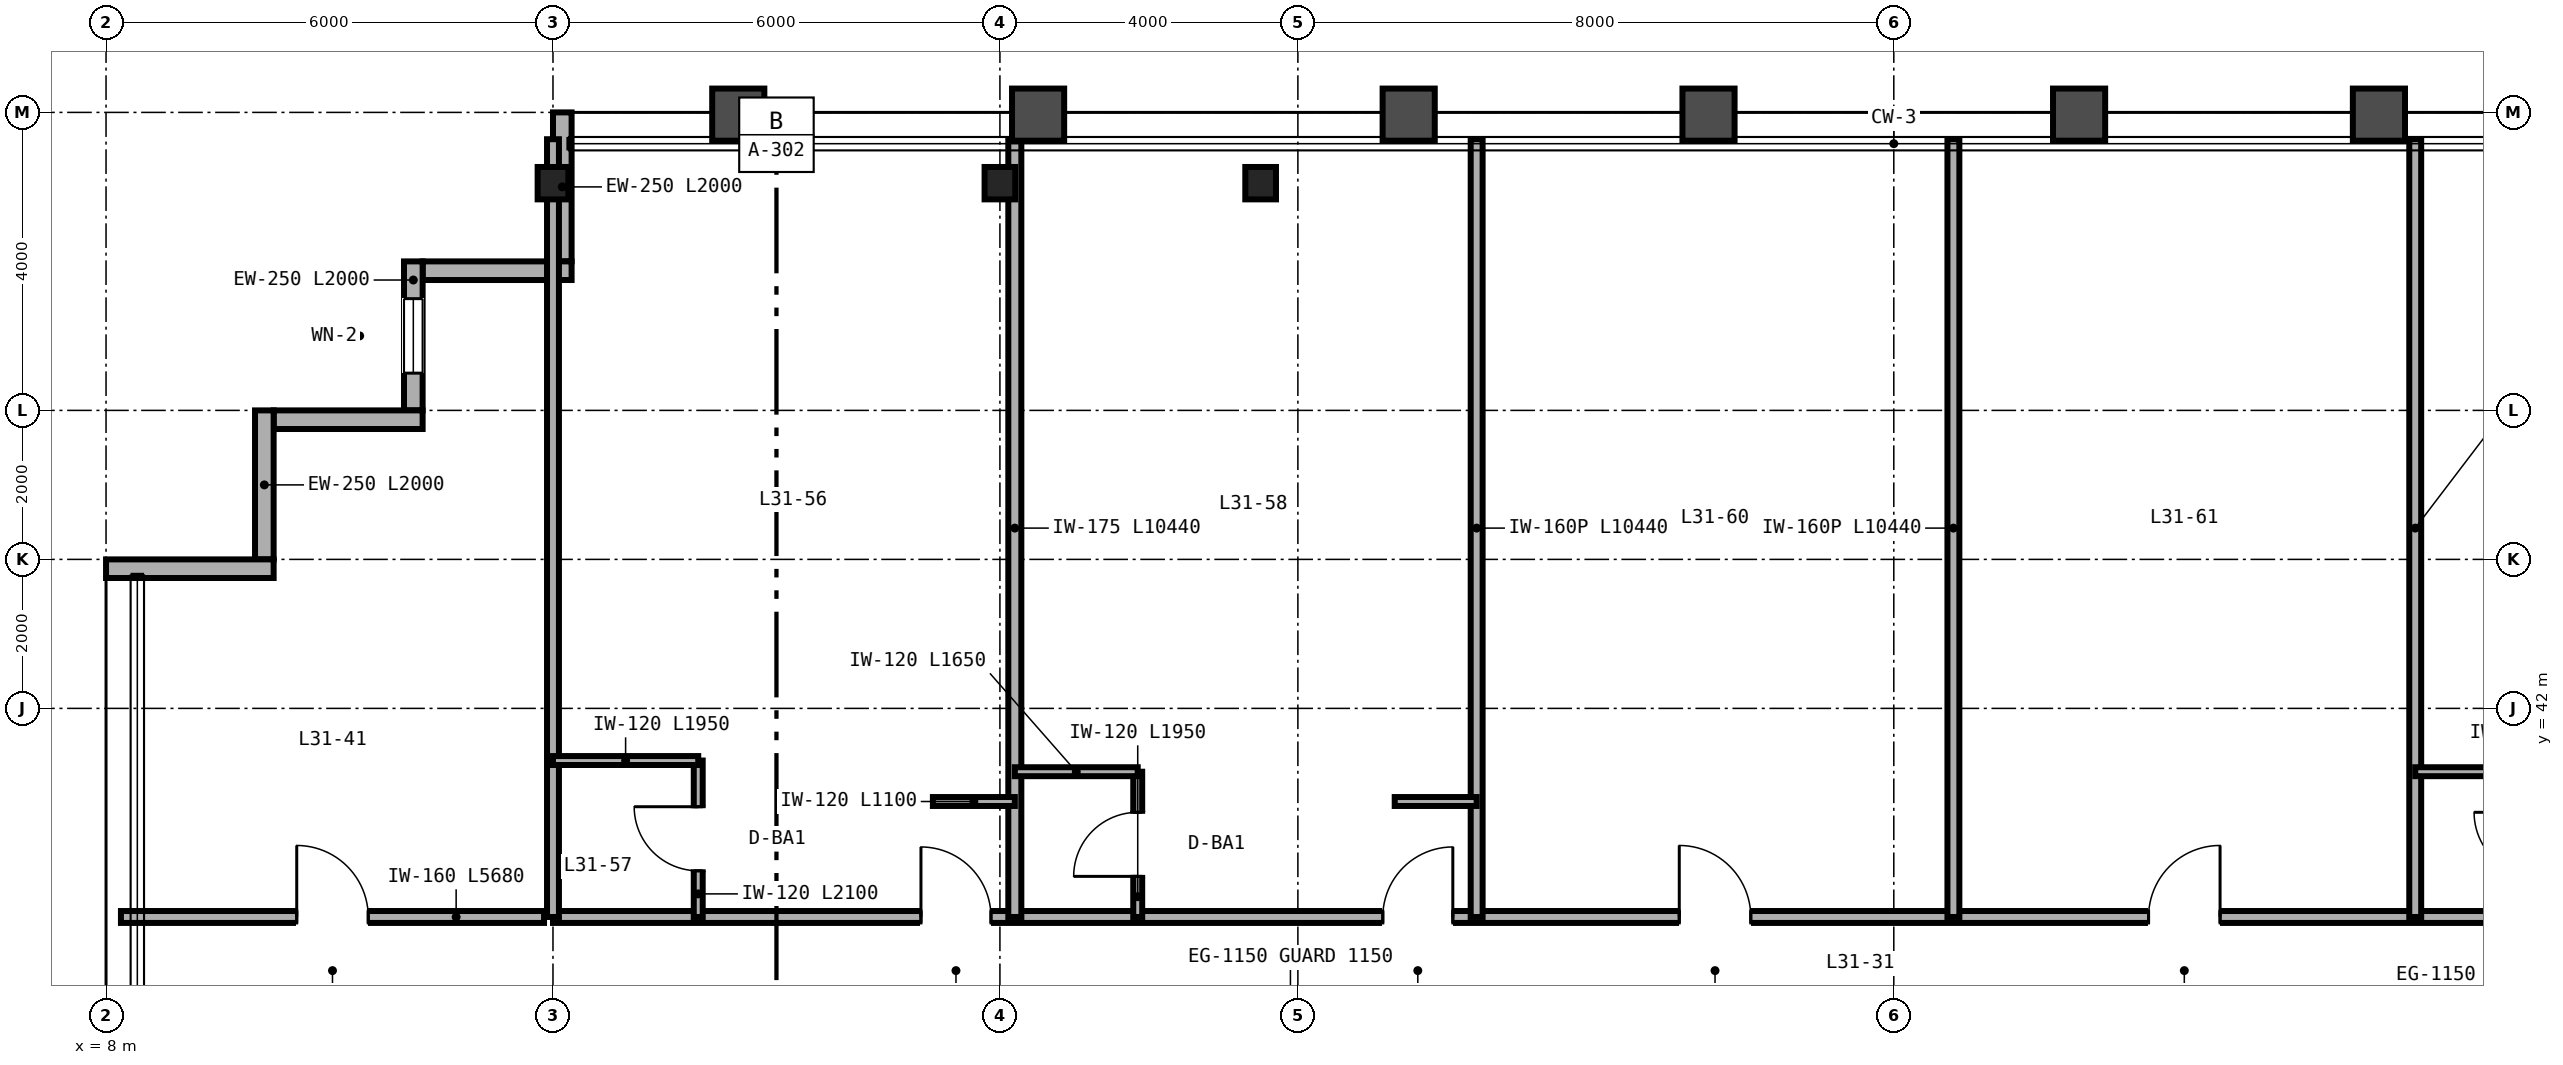
"""IFC4 building model, lengths in metres.
Left out: names, types, materials, properties, quantities, classifications, styles, units other than length and angle.
Written with IfcOpenShell. Run it as: python <this file> out.ifc"""

import sys

from ifc_helpers import new_model, si_unit, direction, frame, frame_2d, origin, origin_2d, place, context, subcontext, project, spatial, rectangle, i_section, extrude, source, transform, mapped, element, fill, save


model = new_model("IFC4")
c1 = context("Model", 3, precision=1e-05, world=origin(), true_north=direction((0.0, 1.0)))
c2 = subcontext(c1, "Body", "Model", "MODEL_VIEW")
j1 = project(units=[si_unit("LENGTHUNIT", "METRE"), si_unit("PLANEANGLEUNIT", "RADIAN")], contexts=[c1])
p1 = place(None, origin())
s1 = spatial("IfcSite", under=j1, at=p1, CompositionType="ELEMENT")
p2 = place(p1, origin())
s2 = spatial("IfcBuilding", under=s1, at=p2, CompositionType="ELEMENT")
p3 = place(p2, frame((0.0, 0.0, 126.0)))
s3 = spatial("IfcBuildingStorey", under=s2, at=p3, CompositionType="ELEMENT", Elevation=126.0)
m1 = source(origin(), c2, "Body", "SweptSolid", [
    extrude(i_section(OverallWidth=0.412, OverallDepth=0.435, WebThickness=0.036, FlangeThickness=0.057, FilletRadius=0.025, at=origin_2d()), origin(), (0.0, 0.0, 1.0), 3.36),
])
for number, where, z_axis, x_axis in (
    (1, (14.0, 49.05, 0.0), (0.0, 0.0, 1.0), (1.0, 0.0, 0.0)),
    (2, (20.0, 49.05, 0.0), (0.0, 0.0, 1.0), (1.0, 0.0, 0.0)),
    (3, (23.5, 49.05, 0.0), (0.0, 0.0, 1.0), (1.0, 0.0, 0.0)),
):
    element("IfcColumn", number, at=place(p3, frame(where, z_axis=z_axis, x_axis=x_axis)), inside=s3, PredefinedType="COLUMN", context=c2, shape_type="MappedRepresentation", body=[
        mapped(m1, transform((0.0, 0.0, 0.0), scale=1.0)),
    ])
p4 = place(p3, frame((14.125, 50.0, 0.0), z_axis=(0.0, 0.0, 1.0), x_axis=(0.0, -1.0, 0.0)))
e4 = element("IfcWall", 4, at=p4, inside=s3, PredefinedType="SOLIDWALL", context=c2, shape_type="SweptSolid", body=[
    extrude(rectangle(XDim=2.0, YDim=0.25, at=frame_2d((1.0, 0.0))), origin(), (0.0, 0.0, 1.0), 2.667),
])
p5 = place(p3, frame((14.25, 47.875, 0.0), z_axis=(0.0, 0.0, 1.0), x_axis=(-1.0, 0.0, 0.0)))
e5 = element("IfcWall", 5, at=p5, inside=s3, PredefinedType="SOLIDWALL", context=c2, shape_type="SweptSolid", body=[
    extrude(rectangle(XDim=2.0, YDim=0.25, at=frame_2d((1.0, 0.0))), origin(), (0.0, 0.0, 1.0), 3.36),
])
p6 = place(p3, frame((12.125, 48.0, 0.0), z_axis=(0.0, 0.0, 1.0), x_axis=(0.0, -1.0, 0.0)))
e6 = element("IfcWall", 6, at=p6, inside=s3, PredefinedType="SOLIDWALL", context=c2, shape_type="SweptSolid", body=[
    extrude(rectangle(XDim=2.0, YDim=0.25, at=frame_2d((1.0, 0.0))), origin(), (0.0, 0.0, 1.0), 3.36),
])
p7 = place(p6, frame((0.5, 0.0, 0.85)))
e7 = element("IfcOpeningElement", 7, at=p7, cuts=e6, PredefinedType="OPENING", context=c2, shape_type="SweptSolid", body=[
    extrude(rectangle(XDim=1.0, YDim=1.9, at=frame_2d((0.5, 0.95))), frame((0.0, 0.135, 0.0), z_axis=(0.0, -1.0, 0.0), x_axis=(1.0, 0.0, 0.0)), (0.0, 0.0, 1.0), 0.27),
])
for number, where, z_axis, x_axis in (
    (8, (12.25, 45.875, 0.0), (0.0, 0.0, 1.0), (-1.0, 0.0, 0.0)),
    (9, (10.125, 46.0, 0.0), (0.0, 0.0, 1.0), (0.0, -1.0, 0.0)),
):
    element("IfcWall", number, at=place(p3, frame(where, z_axis=z_axis, x_axis=x_axis)), inside=s3, PredefinedType="SOLIDWALL", context=c2, shape_type="SweptSolid", body=[
        extrude(rectangle(XDim=2.0, YDim=0.25, at=frame_2d((1.0, 0.0))), origin(), (0.0, 0.0, 1.0), 3.36),
    ])
p8 = place(p3, frame((10.25, 43.875, 0.0), z_axis=(0.0, 0.0, 1.0), x_axis=(-1.0, 0.0, 0.0)))
e10 = element("IfcWall", 10, at=p8, inside=s3, PredefinedType="SOLIDWALL", context=c2, shape_type="SweptSolid", body=[
    extrude(rectangle(XDim=2.25, YDim=0.25, at=frame_2d((1.125, 0.0))), origin(), (0.0, 0.0, 1.0), 3.36),
])
p9 = place(p3, frame((8.2, 39.2, 0.0), z_axis=(0.0, 0.0, 1.0), x_axis=(1.0, 0.0, 0.0)))
e11 = element("IfcWall", 11, at=p9, inside=s3, PredefinedType="PARTITIONING", context=c2, shape_type="SweptSolid", body=[
    extrude(rectangle(XDim=5.68, YDim=0.16, at=frame_2d((2.84, 0.0))), origin(), (0.0, 0.0, 1.0), 3.36),
])
p10 = place(p9, frame((2.36, 0.0, 0.0)))
e12 = element("IfcOpeningElement", 12, at=p10, cuts=e11, PredefinedType="OPENING", context=c2, shape_type="SweptSolid", body=[
    extrude(rectangle(XDim=0.96, YDim=2.15, at=frame_2d((0.48, 1.075))), frame((0.0, 0.09, 0.0), z_axis=(0.0, -1.0, 0.0), x_axis=(1.0, 0.0, 0.0)), (0.0, 0.0, 1.0), 0.18),
])
p11 = place(p3, frame((14.0, 39.2, 0.0), z_axis=(0.0, 0.0, 1.0), x_axis=(1.0, 0.0, 0.0)))
e13 = element("IfcWall", 13, at=p11, inside=s3, PredefinedType="PARTITIONING", context=c2, shape_type="SweptSolid", body=[
    extrude(rectangle(XDim=36.0, YDim=0.16, at=frame_2d((18.0, 0.0))), origin(), (0.0, 0.0, 1.0), 2.581),
])
p12 = place(p11, frame((4.94, 0.0, 0.0)))
e14 = element("IfcOpeningElement", 14, at=p12, cuts=e13, PredefinedType="OPENING", context=c2, shape_type="SweptSolid", body=[
    extrude(rectangle(XDim=0.94, YDim=2.15, at=frame_2d((0.47, 1.075))), frame((0.0, 0.09, 0.0), z_axis=(0.0, -1.0, 0.0), x_axis=(1.0, 0.0, 0.0)), (0.0, 0.0, 1.0), 0.18),
])
p13 = place(p11, frame((11.14, 0.0, 0.0)))
e15 = element("IfcOpeningElement", 15, at=p13, cuts=e13, PredefinedType="OPENING", context=c2, shape_type="SweptSolid", body=[
    extrude(rectangle(XDim=0.94, YDim=2.15, at=frame_2d((0.47, 1.075))), frame((0.0, 0.09, 0.0), z_axis=(0.0, -1.0, 0.0), x_axis=(1.0, 0.0, 0.0)), (0.0, 0.0, 1.0), 0.18),
])
p14 = place(p11, frame((15.12, 0.0, 0.0)))
e16 = element("IfcOpeningElement", 16, at=p14, cuts=e13, PredefinedType="OPENING", context=c2, shape_type="SweptSolid", body=[
    extrude(rectangle(XDim=0.96, YDim=2.15, at=frame_2d((0.48, 1.075))), frame((0.0, 0.09, 0.0), z_axis=(0.0, -1.0, 0.0), x_axis=(1.0, 0.0, 0.0)), (0.0, 0.0, 1.0), 0.18),
])
p15 = place(p11, frame((21.42, 0.0, 0.0)))
e17 = element("IfcOpeningElement", 17, at=p15, cuts=e13, PredefinedType="OPENING", context=c2, shape_type="SweptSolid", body=[
    extrude(rectangle(XDim=0.96, YDim=2.15, at=frame_2d((0.48, 1.075))), frame((0.0, 0.09, 0.0), z_axis=(0.0, -1.0, 0.0), x_axis=(1.0, 0.0, 0.0)), (0.0, 0.0, 1.0), 0.18),
])
p16 = place(p11, frame((29.34, 0.0, 0.0)))
e18 = element("IfcOpeningElement", 18, at=p16, cuts=e13, PredefinedType="OPENING", context=c2, shape_type="SweptSolid", body=[
    extrude(rectangle(XDim=0.94, YDim=2.15, at=frame_2d((0.47, 1.075))), frame((0.0, 0.09, 0.0), z_axis=(0.0, -1.0, 0.0), x_axis=(1.0, 0.0, 0.0)), (0.0, 0.0, 1.0), 0.18),
])
p17 = place(p11, frame((34.74, 0.0, 0.0)))
e19 = element("IfcOpeningElement", 19, at=p17, cuts=e13, PredefinedType="OPENING", context=c2, shape_type="SweptSolid", body=[
    extrude(rectangle(XDim=0.94, YDim=2.15, at=frame_2d((0.47, 1.075))), frame((0.0, 0.09, 0.0), z_axis=(0.0, -1.0, 0.0), x_axis=(1.0, 0.0, 0.0)), (0.0, 0.0, 1.0), 0.18),
])
p18 = place(p3, frame((14.0, 39.2, 0.0), z_axis=(0.0, 0.0, 1.0), x_axis=(0.0, 1.0, 0.0)))
e20 = element("IfcWall", 20, at=p18, inside=s3, PredefinedType="PARTITIONING", context=c2, shape_type="SweptSolid", body=[
    extrude(rectangle(XDim=10.44, YDim=0.16, at=frame_2d((5.22, 0.0))), origin(), (0.0, 0.0, 1.0), 2.667),
])
p19 = place(p3, frame((20.2, 39.2, 0.0), z_axis=(0.0, 0.0, 1.0), x_axis=(0.0, 1.0, 0.0)))
e21 = element("IfcWall", 21, at=p19, inside=s3, PredefinedType="PARTITIONING", context=c2, shape_type="SweptSolid", body=[
    extrude(rectangle(XDim=10.44, YDim=0.175, at=frame_2d((5.22, 0.0))), origin(), (0.0, 0.0, 1.0), 2.667),
])
p20 = place(p3, frame((15.95, 39.2, 0.0), z_axis=(0.0, 0.0, 1.0), x_axis=(0.0, 1.0, 0.0)))
e22 = element("IfcWall", 22, at=p20, inside=s3, PredefinedType="PARTITIONING", context=c2, shape_type="SweptSolid", body=[
    extrude(rectangle(XDim=2.1, YDim=0.12, at=frame_2d((1.05, 0.0))), origin(), (0.0, 0.0, 1.0), 3.36),
])
p21 = place(p20, frame((0.62, 0.0, 0.0)))
e23 = element("IfcOpeningElement", 23, at=p21, cuts=e22, PredefinedType="OPENING", context=c2, shape_type="SweptSolid", body=[
    extrude(rectangle(XDim=0.86, YDim=2.1, at=frame_2d((0.43, 1.05))), frame((0.0, 0.07, 0.0), z_axis=(0.0, -1.0, 0.0), x_axis=(1.0, 0.0, 0.0)), (0.0, 0.0, 1.0), 0.14),
])
p22 = place(p3, frame((14.0, 41.3, 0.0), z_axis=(0.0, 0.0, 1.0), x_axis=(1.0, 0.0, 0.0)))
e24 = element("IfcWall", 24, at=p22, inside=s3, PredefinedType="PARTITIONING", context=c2, shape_type="SweptSolid", body=[
    extrude(rectangle(XDim=1.95, YDim=0.12, at=frame_2d((0.975, 0.0))), origin(), (0.0, 0.0, 1.0), 3.36),
])
p23 = place(p3, frame((19.1, 40.75, 0.0), z_axis=(0.0, 0.0, 1.0), x_axis=(1.0, 0.0, 0.0)))
e25 = element("IfcWall", 25, at=p23, inside=s3, PredefinedType="PARTITIONING", context=c2, shape_type="SweptSolid", body=[
    extrude(rectangle(XDim=1.1, YDim=0.12, at=frame_2d((0.55, 0.0))), origin(), (0.0, 0.0, 1.0), 3.36),
])
p24 = place(p3, frame((26.4, 39.2, 0.0), z_axis=(0.0, 0.0, 1.0), x_axis=(0.0, 1.0, 0.0)))
e26 = element("IfcWall", 26, at=p24, inside=s3, PredefinedType="PARTITIONING", context=c2, shape_type="SweptSolid", body=[
    extrude(rectangle(XDim=10.44, YDim=0.16, at=frame_2d((5.22, 0.0))), origin(), (0.0, 0.0, 1.0), 2.433),
])
p25 = place(p3, frame((21.85, 39.2, 0.0), z_axis=(0.0, 0.0, 1.0), x_axis=(0.0, 1.0, 0.0)))
e27 = element("IfcWall", 27, at=p25, inside=s3, PredefinedType="PARTITIONING", context=c2, shape_type="SweptSolid", body=[
    extrude(rectangle(XDim=1.95, YDim=0.12, at=frame_2d((0.975, 0.0))), origin(), (0.0, 0.0, 1.0), 3.36),
])
p26 = place(p25, frame((0.545, 0.0, 0.0)))
e28 = element("IfcOpeningElement", 28, at=p26, cuts=e27, PredefinedType="OPENING", context=c2, shape_type="SweptSolid", body=[
    extrude(rectangle(XDim=0.86, YDim=2.1, at=frame_2d((0.43, 1.05))), frame((0.0, 0.07, 0.0), z_axis=(0.0, -1.0, 0.0), x_axis=(1.0, 0.0, 0.0)), (0.0, 0.0, 1.0), 0.14),
])
p27 = place(p3, frame((20.2, 41.15, 0.0), z_axis=(0.0, 0.0, 1.0), x_axis=(1.0, 0.0, 0.0)))
e29 = element("IfcWall", 29, at=p27, inside=s3, PredefinedType="PARTITIONING", context=c2, shape_type="SweptSolid", body=[
    extrude(rectangle(XDim=1.65, YDim=0.12, at=frame_2d((0.825, 0.0))), origin(), (0.0, 0.0, 1.0), 3.36),
])
p28 = place(p3, frame((25.3, 40.75, 0.0), z_axis=(0.0, 0.0, 1.0), x_axis=(1.0, 0.0, 0.0)))
e30 = element("IfcWall", 30, at=p28, inside=s3, PredefinedType="PARTITIONING", context=c2, shape_type="SweptSolid", body=[
    extrude(rectangle(XDim=1.1, YDim=0.12, at=frame_2d((0.55, 0.0))), origin(), (0.0, 0.0, 1.0), 3.36),
])
for number, where, z_axis, x_axis in (
    (31, (32.8, 39.2, 0.0), (0.0, 0.0, 1.0), (0.0, 1.0, 0.0)),
    (32, (39.0, 39.2, 0.0), (0.0, 0.0, 1.0), (0.0, 1.0, 0.0)),
):
    element("IfcWall", number, at=place(p3, frame(where, z_axis=z_axis, x_axis=x_axis)), inside=s3, PredefinedType="PARTITIONING", context=c2, shape_type="SweptSolid", body=[
        extrude(rectangle(XDim=10.44, YDim=0.16, at=frame_2d((5.22, 0.0))), origin(), (0.0, 0.0, 1.0), 2.433),
    ])
p29 = place(p3, frame((39.0, 41.15, 0.0), z_axis=(0.0, 0.0, 1.0), x_axis=(1.0, 0.0, 0.0)))
e33 = element("IfcWall", 33, at=p29, inside=s3, PredefinedType="PARTITIONING", context=c2, shape_type="SweptSolid", body=[
    extrude(rectangle(XDim=1.65, YDim=0.12, at=frame_2d((0.825, 0.0))), origin(), (0.0, 0.0, 1.0), 2.581),
])
m2 = source(origin(), c2, "Body", "SweptSolid", [
    extrude(rectangle(XDim=1.0, YDim=1.9, at=frame_2d((0.5, 0.95))), frame((0.0, 0.03, 0.0), z_axis=(0.0, -1.0, 0.0), x_axis=(1.0, 0.0, 0.0)), (0.0, 0.0, 1.0), 0.06),
])
p30 = place(p7, origin())
e34 = element("IfcWindow", 34, at=p30, inside=s3, PartitioningType="SINGLE_PANEL", PredefinedType="WINDOW", context=c2, shape_type="MappedRepresentation", body=[
    mapped(m2, transform((0.0, 0.0, 0.0), scale=1.0)),
])
fill(e7, e34)
m3 = source(origin(), c2, "Body", "SweptSolid", [
    extrude(rectangle(XDim=0.96, YDim=2.15, at=frame_2d((0.48, 1.075))), frame((0.0, 0.025, 0.0), z_axis=(0.0, -1.0, 0.0), x_axis=(1.0, 0.0, 0.0)), (0.0, 0.0, 1.0), 0.05),
])
p31 = place(p10, origin())
e35 = element("IfcDoor", 35, at=p31, inside=s3, OperationType="SINGLE_SWING_LEFT", PredefinedType="DOOR", context=c2, shape_type="MappedRepresentation", body=[
    mapped(m3, transform((0.0, 0.0, 0.0), scale=1.0)),
])
fill(e12, e35)
m4 = source(origin(), c2, "Body", "SweptSolid", [
    extrude(rectangle(XDim=0.86, YDim=2.1, at=frame_2d((0.43, 1.05))), frame((0.0, 0.025, 0.0), z_axis=(0.0, -1.0, 0.0), x_axis=(1.0, 0.0, 0.0)), (0.0, 0.0, 1.0), 0.05),
])
p32 = place(p21, origin())
e36 = element("IfcDoor", 36, at=p32, inside=s3, OperationType="SINGLE_SWING_RIGHT", PredefinedType="DOOR", context=c2, shape_type="MappedRepresentation", body=[
    mapped(m4, transform((0.0, 0.0, 0.0), scale=1.0)),
])
fill(e23, e36)
p33 = place(p26, origin())
e37 = element("IfcDoor", 37, at=p33, inside=s3, OperationType="SINGLE_SWING_LEFT", PredefinedType="DOOR", context=c2, shape_type="MappedRepresentation", body=[
    mapped(m4, transform((0.0, 0.0, 0.0), scale=1.0)),
])
fill(e28, e37)
m5 = source(origin(), c2, "Body", "SweptSolid", [
    extrude(rectangle(XDim=0.94, YDim=2.15, at=frame_2d((0.47, 1.075))), frame((0.0, 0.025, 0.0), z_axis=(0.0, -1.0, 0.0), x_axis=(1.0, 0.0, 0.0)), (0.0, 0.0, 1.0), 0.05),
])
p34 = place(p12, origin())
e38 = element("IfcDoor", 38, at=p34, inside=s3, OperationType="SINGLE_SWING_LEFT", PredefinedType="DOOR", context=c2, shape_type="MappedRepresentation", body=[
    mapped(m5, transform((0.0, 0.0, 0.0), scale=1.0)),
])
fill(e14, e38)
p35 = place(p13, origin())
e39 = element("IfcDoor", 39, at=p35, inside=s3, OperationType="SINGLE_SWING_RIGHT", PredefinedType="DOOR", context=c2, shape_type="MappedRepresentation", body=[
    mapped(m5, transform((0.0, 0.0, 0.0), scale=1.0)),
])
fill(e15, e39)
p36 = place(p14, origin())
e40 = element("IfcDoor", 40, at=p36, inside=s3, OperationType="SINGLE_SWING_LEFT", PredefinedType="DOOR", context=c2, shape_type="MappedRepresentation", body=[
    mapped(m3, transform((0.0, 0.0, 0.0), scale=1.0)),
])
fill(e16, e40)
p37 = place(p15, origin())
e41 = element("IfcDoor", 41, at=p37, inside=s3, OperationType="SINGLE_SWING_RIGHT", PredefinedType="DOOR", context=c2, shape_type="MappedRepresentation", body=[
    mapped(m3, transform((0.0, 0.0, 0.0), scale=1.0)),
])
fill(e17, e41)
save(model, sys.argv[1])
